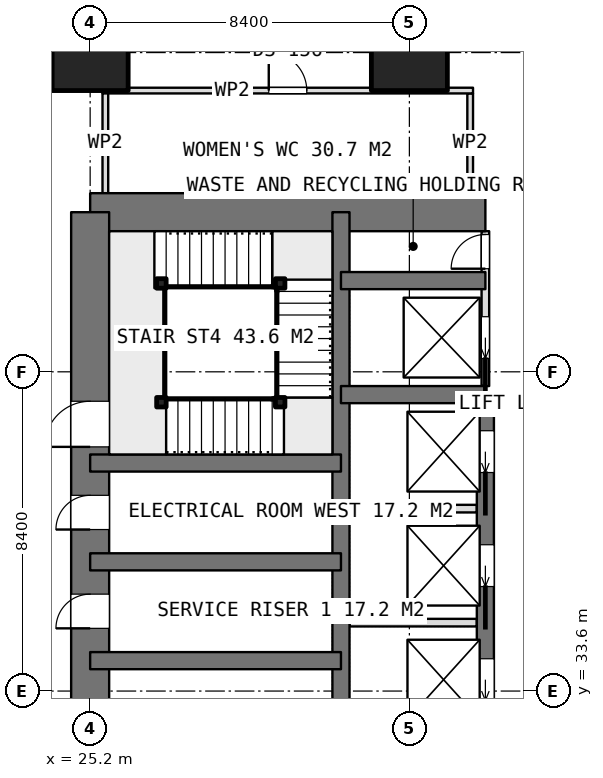
"""IFC4 building model, lengths in metres.
Left out: names, types, materials, properties, quantities, classifications, styles, units other than length and angle.
Written with IfcOpenShell. Run it as: python <this file> out.ifc"""

import sys

from ifc_helpers import new_model, si_unit, direction, frame, frame_2d, origin, origin_2d, place, context, subcontext, project, spatial, rectangle, extrude, element, fill, save


model = new_model("IFC4")
c1 = context("Model", 3, precision=1e-05, world=origin(), true_north=direction((0.0, 1.0)))
c2 = subcontext(c1, "Body", "Model", "MODEL_VIEW")
j1 = project(units=[si_unit("LENGTHUNIT", "METRE"), si_unit("PLANEANGLEUNIT", "RADIAN")], contexts=[c1])
p1 = place(None, origin())
s1 = spatial("IfcSite", under=j1, at=p1, CompositionType="ELEMENT")
p2 = place(p1, origin())
s2 = spatial("IfcBuilding", under=s1, at=p2, CompositionType="ELEMENT")
p3 = place(p2, frame((0.0, 0.0, 144.05)))
s3 = spatial("IfcBuildingStorey", under=s2, at=p3, CompositionType="ELEMENT", Elevation=144.05)
p4 = place(p3, frame((25.2, 46.2, 0.0), z_axis=(0.0, 0.0, 1.0), x_axis=(1.0, 0.0, 0.0)))
e1 = element("IfcWall", 1, at=p4, inside=s3, PredefinedType="SHEAR", context=c2, shape_type="SweptSolid", body=[
    extrude(rectangle(XDim=10.4, YDim=1.0, at=frame_2d((5.2, 0.0))), origin(), (0.0, 0.0, 1.0), 3.75),
])
p5 = place(p3, frame((25.2, 21.0, 0.0), z_axis=(0.0, 0.0, 1.0), x_axis=(0.0, 1.0, 0.0)))
e2 = element("IfcWall", 2, at=p5, inside=s3, PredefinedType="SHEAR", context=c2, shape_type="SweptSolid", body=[
    extrude(rectangle(XDim=25.2, YDim=1.0, at=frame_2d((12.6, 0.0))), origin(), (0.0, 0.0, 1.0), 3.75),
])
p6 = place(p5, frame((7.8, 0.0, 0.0)))
e3 = element("IfcOpeningElement", 3, at=p6, cuts=e2, PredefinedType="OPENING", context=c2, shape_type="SweptSolid", body=[
    extrude(rectangle(XDim=1.2, YDim=2.1, at=frame_2d((0.6, 1.05))), frame((0.0, 0.51, 0.0), z_axis=(0.0, -1.0, 0.0), x_axis=(1.0, 0.0, 0.0)), (0.0, 0.0, 1.0), 1.02),
])
p7 = place(p5, frame((14.25, 0.0, 0.0)))
e4 = element("IfcOpeningElement", 4, at=p7, cuts=e2, PredefinedType="OPENING", context=c2, shape_type="SweptSolid", body=[
    extrude(rectangle(XDim=0.9, YDim=2.1, at=frame_2d((0.45, 1.05))), frame((0.0, 0.51, 0.0), z_axis=(0.0, -1.0, 0.0), x_axis=(1.0, 0.0, 0.0)), (0.0, 0.0, 1.0), 1.02),
])
p8 = place(p5, frame((16.85, 0.0, 0.0)))
e5 = element("IfcOpeningElement", 5, at=p8, cuts=e2, PredefinedType="OPENING", context=c2, shape_type="SweptSolid", body=[
    extrude(rectangle(XDim=0.9, YDim=2.1, at=frame_2d((0.45, 1.05))), frame((0.0, 0.51, 0.0), z_axis=(0.0, -1.0, 0.0), x_axis=(1.0, 0.0, 0.0)), (0.0, 0.0, 1.0), 1.02),
])
p9 = place(p5, frame((19.025, 0.0, 0.0)))
e6 = element("IfcOpeningElement", 6, at=p9, cuts=e2, PredefinedType="OPENING", context=c2, shape_type="SweptSolid", body=[
    extrude(rectangle(XDim=1.2, YDim=2.1, at=frame_2d((0.6, 1.05))), frame((0.0, 0.51, 0.0), z_axis=(0.0, -1.0, 0.0), x_axis=(1.0, 0.0, 0.0)), (0.0, 0.0, 1.0), 1.02),
])
p10 = place(p3, frame((31.8, 21.0, 0.0), z_axis=(0.0, 0.0, 1.0), x_axis=(0.0, 1.0, 0.0)))
e7 = element("IfcWall", 7, at=p10, inside=s3, PredefinedType="SHEAR", context=c2, shape_type="SweptSolid", body=[
    extrude(rectangle(XDim=25.2, YDim=0.45, at=frame_2d((12.6, 0.0))), origin(), (0.0, 0.0, 1.0), 3.75),
])
p11 = place(p3, frame((35.6, 23.4, 0.0), z_axis=(0.0, 0.0, 1.0), x_axis=(0.0, 1.0, 0.0)))
e8 = element("IfcWall", 8, at=p11, inside=s3, PredefinedType="SHEAR", context=c2, shape_type="SweptSolid", body=[
    extrude(rectangle(XDim=18.0, YDim=0.45, at=frame_2d((9.0, 0.0))), origin(), (0.0, 0.0, 1.0), 3.75),
])
p12 = place(p11, frame((0.95, 0.0, 0.0)))
e9 = element("IfcOpeningElement", 9, at=p12, cuts=e8, PredefinedType="OPENING", context=c2, shape_type="SweptSolid", body=[
    extrude(rectangle(XDim=1.1, YDim=2.1, at=frame_2d((0.55, 1.05))), frame((0.0, 0.235, 0.0), z_axis=(0.0, -1.0, 0.0), x_axis=(1.0, 0.0, 0.0)), (0.0, 0.0, 1.0), 0.47),
])
p13 = place(p11, frame((3.95, 0.0, 0.0)))
e10 = element("IfcOpeningElement", 10, at=p13, cuts=e8, PredefinedType="OPENING", context=c2, shape_type="SweptSolid", body=[
    extrude(rectangle(XDim=1.1, YDim=2.1, at=frame_2d((0.55, 1.05))), frame((0.0, 0.235, 0.0), z_axis=(0.0, -1.0, 0.0), x_axis=(1.0, 0.0, 0.0)), (0.0, 0.0, 1.0), 0.47),
])
p14 = place(p11, frame((6.95, 0.0, 0.0)))
e11 = element("IfcOpeningElement", 11, at=p14, cuts=e8, PredefinedType="OPENING", context=c2, shape_type="SweptSolid", body=[
    extrude(rectangle(XDim=1.1, YDim=2.1, at=frame_2d((0.55, 1.05))), frame((0.0, 0.235, 0.0), z_axis=(0.0, -1.0, 0.0), x_axis=(1.0, 0.0, 0.0)), (0.0, 0.0, 1.0), 0.47),
])
p15 = place(p11, frame((9.95, 0.0, 0.0)))
e12 = element("IfcOpeningElement", 12, at=p15, cuts=e8, PredefinedType="OPENING", context=c2, shape_type="SweptSolid", body=[
    extrude(rectangle(XDim=1.1, YDim=2.1, at=frame_2d((0.55, 1.05))), frame((0.0, 0.235, 0.0), z_axis=(0.0, -1.0, 0.0), x_axis=(1.0, 0.0, 0.0)), (0.0, 0.0, 1.0), 0.47),
])
p16 = place(p11, frame((12.95, 0.0, 0.0)))
e13 = element("IfcOpeningElement", 13, at=p16, cuts=e8, PredefinedType="OPENING", context=c2, shape_type="SweptSolid", body=[
    extrude(rectangle(XDim=1.1, YDim=2.1, at=frame_2d((0.55, 1.05))), frame((0.0, 0.235, 0.0), z_axis=(0.0, -1.0, 0.0), x_axis=(1.0, 0.0, 0.0)), (0.0, 0.0, 1.0), 0.47),
])
p17 = place(p11, frame((15.95, 0.0, 0.0)))
e14 = element("IfcOpeningElement", 14, at=p17, cuts=e8, PredefinedType="OPENING", context=c2, shape_type="SweptSolid", body=[
    extrude(rectangle(XDim=1.1, YDim=2.1, at=frame_2d((0.55, 1.05))), frame((0.0, 0.235, 0.0), z_axis=(0.0, -1.0, 0.0), x_axis=(1.0, 0.0, 0.0)), (0.0, 0.0, 1.0), 0.47),
])
for number, where, z_axis, x_axis in (
    (15, (31.8, 41.4, 0.0), (0.0, 0.0, 1.0), (1.0, 0.0, 0.0)),
    (16, (31.8, 44.4, 0.0), (0.0, 0.0, 1.0), (1.0, 0.0, 0.0)),
):
    element("IfcWall", number, at=place(p3, frame(where, z_axis=z_axis, x_axis=x_axis)), inside=s3, PredefinedType="SHEAR", context=c2, shape_type="SweptSolid", body=[
        extrude(rectangle(XDim=3.8, YDim=0.45, at=frame_2d((1.9, 0.0))), origin(), (0.0, 0.0, 1.0), 3.75),
    ])
for number, where, z_axis, x_axis in (
    (17, (25.2, 34.4, 0.0), (0.0, 0.0, 1.0), (1.0, 0.0, 0.0)),
    (18, (25.2, 37.0, 0.0), (0.0, 0.0, 1.0), (1.0, 0.0, 0.0)),
    (19, (25.2, 39.6, 0.0), (0.0, 0.0, 1.0), (1.0, 0.0, 0.0)),
):
    element("IfcWall", number, at=place(p3, frame(where, z_axis=z_axis, x_axis=x_axis)), inside=s3, PredefinedType="SHEAR", context=c2, shape_type="SweptSolid", body=[
        extrude(rectangle(XDim=6.6, YDim=0.45, at=frame_2d((3.3, 0.0))), origin(), (0.0, 0.0, 1.0), 3.75),
    ])
for number, where, z_axis, x_axis in (
    (20, (25.2, 50.4, 0.0), (0.0, 0.0, 1.0), (1.0, 0.0, 0.0)),
    (21, (33.6, 50.4, 0.0), (0.0, 0.0, 1.0), (1.0, 0.0, 0.0)),
):
    element("IfcColumn", number, at=place(p3, frame(where, z_axis=z_axis, x_axis=x_axis)), inside=s3, PredefinedType="COLUMN", context=c2, shape_type="SweptSolid", body=[
        extrude(rectangle(XDim=2.0, YDim=2.0, at=origin_2d()), origin(), (0.0, 0.0, 1.0), 3.75),
    ])
for number, where, z_axis, x_axis in (
    (22, (32.025, 35.4, 0.0), (0.0, 0.0, 1.0), (1.0, 0.0, 0.0)),
    (23, (32.025, 38.4, 0.0), (0.0, 0.0, 1.0), (1.0, 0.0, 0.0)),
):
    element("IfcWall", number, at=place(p3, frame(where, z_axis=z_axis, x_axis=x_axis)), inside=s3, PredefinedType="PARTITIONING", context=c2, shape_type="SweptSolid", body=[
        extrude(rectangle(XDim=3.35, YDim=0.2, at=frame_2d((1.675, 0.0))), origin(), (0.0, 0.0, 1.0), 3.5),
    ])
p18 = place(p3, frame((35.6, 41.625, 0.0), z_axis=(0.0, 0.0, 1.0), x_axis=(0.0, 1.0, 0.0)))
e24 = element("IfcWall", 24, at=p18, inside=s3, PredefinedType="PARTITIONING", context=c2, shape_type="SweptSolid", body=[
    extrude(rectangle(XDim=4.075, YDim=0.2, at=frame_2d((2.038, 0.0))), origin(), (0.0, 0.0, 1.0), 3.5),
])
p19 = place(p18, frame((3.088, 0.0, 0.0)))
e25 = element("IfcOpeningElement", 25, at=p19, cuts=e24, PredefinedType="OPENING", context=c2, shape_type="SweptSolid", body=[
    extrude(rectangle(XDim=0.9, YDim=2.1, at=frame_2d((0.45, 1.05))), frame((0.0, 0.11, 0.0), z_axis=(0.0, -1.0, 0.0), x_axis=(1.0, 0.0, 0.0)), (0.0, 0.0, 1.0), 0.22),
])
p20 = place(p18, frame((0.725, 0.0, 0.0)))
e26 = element("IfcOpeningElement", 26, at=p20, cuts=e24, PredefinedType="OPENING", context=c2, shape_type="SweptSolid", body=[
    extrude(rectangle(XDim=1.1, YDim=2.1, at=frame_2d((0.55, 1.05))), frame((0.0, 0.11, 0.0), z_axis=(0.0, -1.0, 0.0), x_axis=(1.0, 0.0, 0.0)), (0.0, 0.0, 1.0), 0.22),
])
p21 = place(p3, frame((25.525, 49.4, 0.0), z_axis=(0.0, 0.0, 1.0), x_axis=(1.0, 0.0, 0.0)))
e27 = element("IfcWall", 27, at=p21, inside=s3, PredefinedType="PARTITIONING", context=c2, shape_type="SweptSolid", body=[
    extrude(rectangle(XDim=9.75, YDim=0.15, at=frame_2d((4.875, 0.0))), origin(), (0.0, 0.0, 1.0), 3.5),
])
p22 = place(p21, frame((4.375, 0.0, 0.0)))
e28 = element("IfcOpeningElement", 28, at=p22, cuts=e27, PredefinedType="OPENING", context=c2, shape_type="SweptSolid", body=[
    extrude(rectangle(XDim=1.0, YDim=2.1, at=frame_2d((0.5, 1.05))), frame((0.0, 0.085, 0.0), z_axis=(0.0, -1.0, 0.0), x_axis=(1.0, 0.0, 0.0)), (0.0, 0.0, 1.0), 0.17),
])
for number, where, z_axis, x_axis in (
    (29, (25.6, 46.7, 0.0), (0.0, 0.0, 1.0), (0.0, 1.0, 0.0)),
    (30, (35.2, 46.7, 0.0), (0.0, 0.0, 1.0), (0.0, 1.0, 0.0)),
):
    element("IfcWall", number, at=place(p3, frame(where, z_axis=z_axis, x_axis=x_axis)), inside=s3, PredefinedType="PARTITIONING", context=c2, shape_type="SweptSolid", body=[
        extrude(rectangle(XDim=2.625, YDim=0.15, at=frame_2d((1.312, 0.0))), origin(), (0.0, 0.0, 1.0), 3.5),
    ])
for number, where, z_axis, x_axis in (
    (31, (27.075, 41.2, 0.0), (0.0, 0.0, 1.0), (1.0, 0.0, 0.0)),
    (32, (30.2, 41.2, 0.0), (0.0, 0.0, 1.0), (1.0, 0.0, 0.0)),
    (33, (30.2, 44.325, 0.0), (0.0, 0.0, 1.0), (1.0, 0.0, 0.0)),
    (34, (27.075, 44.325, 0.0), (0.0, 0.0, 1.0), (1.0, 0.0, 0.0)),
):
    element("IfcColumn", number, at=place(p3, frame(where, z_axis=z_axis, x_axis=x_axis)), inside=s3, PredefinedType="COLUMN", context=c2, shape_type="SweptSolid", body=[
        extrude(rectangle(XDim=0.25, YDim=0.25, at=origin_2d()), origin(), (0.0, 0.0, 1.0), 3.75),
    ])
p23 = place(p7, origin())
e35 = element("IfcDoor", 35, at=p23, inside=s3, OperationType="SINGLE_SWING_LEFT", PredefinedType="DOOR", context=c2, shape_type="SweptSolid", body=[
    extrude(rectangle(XDim=0.9, YDim=2.1, at=frame_2d((0.45, 1.05))), frame((0.0, 0.025, 0.0), z_axis=(0.0, -1.0, 0.0), x_axis=(1.0, 0.0, 0.0)), (0.0, 0.0, 1.0), 0.05),
])
fill(e4, e35)
p24 = place(p8, origin())
e36 = element("IfcDoor", 36, at=p24, inside=s3, OperationType="SINGLE_SWING_LEFT", PredefinedType="DOOR", context=c2, shape_type="SweptSolid", body=[
    extrude(rectangle(XDim=0.9, YDim=2.1, at=frame_2d((0.45, 1.05))), frame((0.0, 0.025, 0.0), z_axis=(0.0, -1.0, 0.0), x_axis=(1.0, 0.0, 0.0)), (0.0, 0.0, 1.0), 0.05),
])
fill(e5, e36)
p25 = place(p19, origin())
e37 = element("IfcDoor", 37, at=p25, inside=s3, OperationType="SINGLE_SWING_LEFT", PredefinedType="DOOR", context=c2, shape_type="SweptSolid", body=[
    extrude(rectangle(XDim=0.9, YDim=2.1, at=frame_2d((0.45, 1.05))), frame((0.0, 0.025, 0.0), z_axis=(0.0, -1.0, 0.0), x_axis=(1.0, 0.0, 0.0)), (0.0, 0.0, 1.0), 0.05),
])
fill(e25, e37)
p26 = place(p15, origin())
e38 = element("IfcDoor", 38, at=p26, inside=s3, OperationType="SLIDING_TO_LEFT", PredefinedType="USERDEFINED", context=c2, shape_type="SweptSolid", body=[
    extrude(rectangle(XDim=1.1, YDim=2.1, at=frame_2d((0.55, 1.05))), frame((0.0, 0.025, 0.0), z_axis=(0.0, -1.0, 0.0), x_axis=(1.0, 0.0, 0.0)), (0.0, 0.0, 1.0), 0.05),
])
fill(e12, e38)
p27 = place(p16, origin())
e39 = element("IfcDoor", 39, at=p27, inside=s3, OperationType="SLIDING_TO_LEFT", PredefinedType="USERDEFINED", context=c2, shape_type="SweptSolid", body=[
    extrude(rectangle(XDim=1.1, YDim=2.1, at=frame_2d((0.55, 1.05))), frame((0.0, 0.025, 0.0), z_axis=(0.0, -1.0, 0.0), x_axis=(1.0, 0.0, 0.0)), (0.0, 0.0, 1.0), 0.05),
])
fill(e13, e39)
p28 = place(p17, origin())
e40 = element("IfcDoor", 40, at=p28, inside=s3, OperationType="SLIDING_TO_LEFT", PredefinedType="USERDEFINED", context=c2, shape_type="SweptSolid", body=[
    extrude(rectangle(XDim=1.1, YDim=2.1, at=frame_2d((0.55, 1.05))), frame((0.0, 0.025, 0.0), z_axis=(0.0, -1.0, 0.0), x_axis=(1.0, 0.0, 0.0)), (0.0, 0.0, 1.0), 0.05),
])
fill(e14, e40)
p29 = place(p20, origin())
e41 = element("IfcDoor", 41, at=p29, inside=s3, OperationType="SLIDING_TO_LEFT", PredefinedType="USERDEFINED", context=c2, shape_type="SweptSolid", body=[
    extrude(rectangle(XDim=1.1, YDim=2.1, at=frame_2d((0.55, 1.05))), frame((0.0, 0.025, 0.0), z_axis=(0.0, -1.0, 0.0), x_axis=(1.0, 0.0, 0.0)), (0.0, 0.0, 1.0), 0.05),
])
fill(e26, e41)
p30 = place(p22, origin())
e42 = element("IfcDoor", 42, at=p30, inside=s3, OperationType="SINGLE_SWING_LEFT", PredefinedType="DOOR", context=c2, shape_type="SweptSolid", body=[
    extrude(rectangle(XDim=1.0, YDim=2.1, at=frame_2d((0.5, 1.05))), frame((0.0, 0.025, 0.0), z_axis=(0.0, -1.0, 0.0), x_axis=(1.0, 0.0, 0.0)), (0.0, 0.0, 1.0), 0.05),
])
fill(e28, e42)
p31 = place(p9, origin())
e43 = element("IfcDoor", 43, at=p31, inside=s3, OperationType="SINGLE_SWING_RIGHT", PredefinedType="DOOR", context=c2, shape_type="SweptSolid", body=[
    extrude(rectangle(XDim=1.2, YDim=2.1, at=frame_2d((0.6, 1.05))), frame((0.0, 0.025, 0.0), z_axis=(0.0, -1.0, 0.0), x_axis=(1.0, 0.0, 0.0)), (0.0, 0.0, 1.0), 0.05),
])
fill(e6, e43)
save(model, sys.argv[1])
